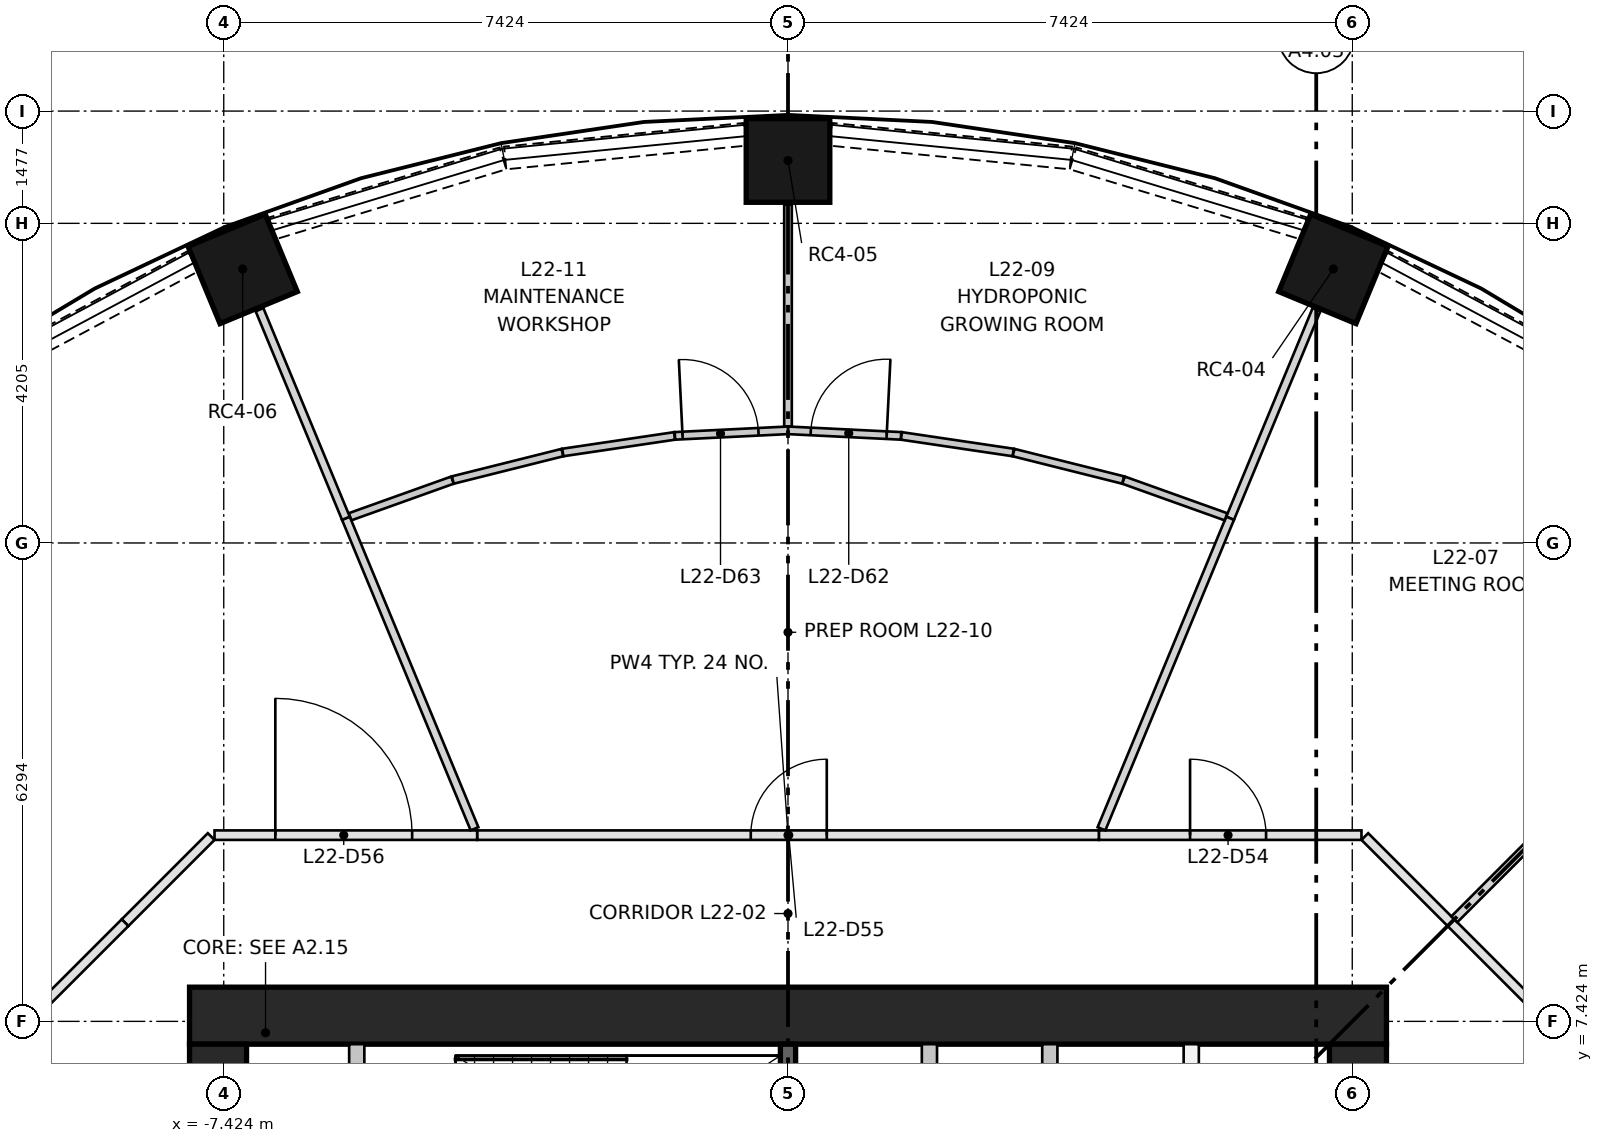
"""IFC4 building model, lengths in metres.
Left out: names, types, materials, properties, quantities, classifications, styles, units other than length and angle.
Written with IfcOpenShell. Run it as: python <this file> out.ifc"""

import sys

from ifc_helpers import new_model, si_unit, direction, frame, frame_2d, origin, origin_2d, place, context, subcontext, project, spatial, rectangle, extrude, element, fill, save


model = new_model("IFC4")
c1 = context("Model", 3, precision=1e-05, world=origin(), true_north=direction((0.0, 1.0)))
c2 = subcontext(c1, "Body", "Model", "MODEL_VIEW")
j1 = project(units=[si_unit("LENGTHUNIT", "METRE"), si_unit("PLANEANGLEUNIT", "RADIAN")], contexts=[c1])
p1 = place(None, origin())
s1 = spatial("IfcSite", under=j1, at=p1, CompositionType="ELEMENT")
p2 = place(p1, origin())
s2 = spatial("IfcBuilding", under=s1, at=p2, CompositionType="ELEMENT")
p3 = place(p2, frame((0.0, 0.0, 87.35)))
s3 = spatial("IfcBuildingStorey", under=s2, at=p3, CompositionType="ELEMENT", Elevation=87.35)
for number, where, z_axis, x_axis in (
    (1, (7.175, 17.323, 0.0), (0.0, 0.0, 1.0), (0.383, 0.924, 0.0)),
    (2, (0.0, 18.75, 0.0), (0.0, 0.0, 1.0), (0.0, 1.0, 0.0)),
    (3, (-7.175, 17.323, 0.0), (0.0, 0.0, 1.0), (-0.383, 0.924, 0.0)),
):
    element("IfcColumn", number, at=place(p3, frame(where, z_axis=z_axis, x_axis=x_axis)), inside=s3, PredefinedType="COLUMN", context=c2, shape_type="SweptSolid", body=[
        extrude(rectangle(XDim=1.1, YDim=1.1, at=origin_2d()), origin(), (0.0, 0.0, 1.0), 3.65),
    ])
p4 = place(p3, frame((-7.874, 7.499, 0.0), z_axis=(0.0, 0.0, 1.0), x_axis=(1.0, 0.0, 0.0)))
e4 = element("IfcWall", 4, at=p4, inside=s3, PredefinedType="SHEAR", context=c2, shape_type="SweptSolid", body=[
    extrude(rectangle(XDim=15.748, YDim=0.75, at=frame_2d((7.874, 0.0))), origin(), (0.0, 0.0, 1.0), 3.65),
])
p5 = place(p3, frame((-7.499, -7.124, 0.0), z_axis=(0.0, 0.0, 1.0), x_axis=(0.0, 1.0, 0.0)))
e5 = element("IfcWall", 5, at=p5, inside=s3, PredefinedType="SHEAR", context=c2, shape_type="SweptSolid", body=[
    extrude(rectangle(XDim=14.248, YDim=0.75, at=frame_2d((7.124, 0.0))), origin(), (0.0, 0.0, 1.0), 3.65),
])
p6 = place(p5, frame((6.624, 0.0, 0.0)))
e6 = element("IfcOpeningElement", 6, at=p6, cuts=e5, PredefinedType="OPENING", context=c2, shape_type="SweptSolid", body=[
    extrude(rectangle(XDim=1.0, YDim=2.1, at=frame_2d((0.5, 1.05))), frame((0.0, 0.385, 0.0), z_axis=(0.0, -1.0, 0.0), x_axis=(1.0, 0.0, 0.0)), (0.0, 0.0, 1.0), 0.77),
])
p7 = place(p5, frame((3.5, 0.0, 0.0)))
e7 = element("IfcOpeningElement", 7, at=p7, cuts=e5, PredefinedType="OPENING", context=c2, shape_type="SweptSolid", body=[
    extrude(rectangle(XDim=1.8, YDim=2.1, at=frame_2d((0.9, 1.05))), frame((0.0, 0.385, 0.0), z_axis=(0.0, -1.0, 0.0), x_axis=(1.0, 0.0, 0.0)), (0.0, 0.0, 1.0), 0.77),
])
p8 = place(p5, frame((8.948, 0.0, 0.0)))
e8 = element("IfcOpeningElement", 8, at=p8, cuts=e5, PredefinedType="OPENING", context=c2, shape_type="SweptSolid", body=[
    extrude(rectangle(XDim=1.8, YDim=2.1, at=frame_2d((0.9, 1.05))), frame((0.0, 0.385, 0.0), z_axis=(0.0, -1.0, 0.0), x_axis=(1.0, 0.0, 0.0)), (0.0, 0.0, 1.0), 0.77),
])
p9 = place(p5, frame((12.124, 0.0, 0.0)))
e9 = element("IfcOpeningElement", 9, at=p9, cuts=e5, PredefinedType="OPENING", context=c2, shape_type="SweptSolid", body=[
    extrude(rectangle(XDim=1.0, YDim=2.1, at=frame_2d((0.5, 1.05))), frame((0.0, 0.385, 0.0), z_axis=(0.0, -1.0, 0.0), x_axis=(1.0, 0.0, 0.0)), (0.0, 0.0, 1.0), 0.77),
])
p10 = place(p3, frame((7.499, -7.124, 0.0), z_axis=(0.0, 0.0, 1.0), x_axis=(0.0, 1.0, 0.0)))
e10 = element("IfcWall", 10, at=p10, inside=s3, PredefinedType="SHEAR", context=c2, shape_type="SweptSolid", body=[
    extrude(rectangle(XDim=14.248, YDim=0.75, at=frame_2d((7.124, 0.0))), origin(), (0.0, 0.0, 1.0), 3.65),
])
p11 = place(p10, frame((6.624, 0.0, 0.0)))
e11 = element("IfcOpeningElement", 11, at=p11, cuts=e10, PredefinedType="OPENING", context=c2, shape_type="SweptSolid", body=[
    extrude(rectangle(XDim=1.0, YDim=2.1, at=frame_2d((0.5, 1.05))), frame((0.0, 0.385, 0.0), z_axis=(0.0, -1.0, 0.0), x_axis=(1.0, 0.0, 0.0)), (0.0, 0.0, 1.0), 0.77),
])
p12 = place(p10, frame((3.5, 0.0, 0.0)))
e12 = element("IfcOpeningElement", 12, at=p12, cuts=e10, PredefinedType="OPENING", context=c2, shape_type="SweptSolid", body=[
    extrude(rectangle(XDim=1.8, YDim=2.1, at=frame_2d((0.9, 1.05))), frame((0.0, 0.385, 0.0), z_axis=(0.0, -1.0, 0.0), x_axis=(1.0, 0.0, 0.0)), (0.0, 0.0, 1.0), 0.77),
])
p13 = place(p10, frame((8.948, 0.0, 0.0)))
e13 = element("IfcOpeningElement", 13, at=p13, cuts=e10, PredefinedType="OPENING", context=c2, shape_type="SweptSolid", body=[
    extrude(rectangle(XDim=1.8, YDim=2.1, at=frame_2d((0.9, 1.05))), frame((0.0, 0.385, 0.0), z_axis=(0.0, -1.0, 0.0), x_axis=(1.0, 0.0, 0.0)), (0.0, 0.0, 1.0), 0.77),
])
p14 = place(p3, frame((0.0, 5.574, 0.0), z_axis=(0.0, 0.0, 1.0), x_axis=(0.0, 1.0, 0.0)))
e14 = element("IfcWall", 14, at=p14, inside=s3, PredefinedType="SHEAR", context=c2, shape_type="SweptSolid", body=[
    extrude(rectangle(XDim=1.55, YDim=0.2, at=frame_2d((0.775, 0.0))), origin(), (0.0, 0.0, 1.0), 3.3),
])
for number, where, z_axis, x_axis in (
    (15, (1.861, 4.174, 0.0), (0.0, 0.0, 1.0), (0.0, 1.0, 0.0)),
    (16, (3.445, 4.174, 0.0), (0.0, 0.0, 1.0), (0.0, 1.0, 0.0)),
    (17, (5.305, 4.174, 0.0), (0.0, 0.0, 1.0), (0.0, 1.0, 0.0)),
):
    element("IfcWall", number, at=place(p3, frame(where, z_axis=z_axis, x_axis=x_axis)), inside=s3, PredefinedType="PARTITIONING", context=c2, shape_type="SweptSolid", body=[
        extrude(rectangle(XDim=2.95, YDim=0.2, at=frame_2d((1.475, 0.0))), origin(), (0.0, 0.0, 1.0), 3.3),
    ])
p15 = place(p3, frame((-5.674, 4.174, 0.0), z_axis=(0.0, 0.0, 1.0), x_axis=(0.0, 1.0, 0.0)))
e18 = element("IfcWall", 18, at=p15, inside=s3, PredefinedType="PARTITIONING", context=c2, shape_type="SweptSolid", body=[
    extrude(rectangle(XDim=2.95, YDim=0.2, at=frame_2d((1.475, 0.0))), origin(), (0.0, 0.0, 1.0), 3.3),
])
p16 = place(p15, frame((0.125, 0.0, 0.0)))
e19 = element("IfcOpeningElement", 19, at=p16, cuts=e18, PredefinedType="OPENING", context=c2, shape_type="SweptSolid", body=[
    extrude(rectangle(XDim=0.95, YDim=2.1, at=frame_2d((0.475, 1.05))), frame((0.0, 0.11, 0.0), z_axis=(0.0, -1.0, 0.0), x_axis=(1.0, 0.0, 0.0)), (0.0, 0.0, 1.0), 0.22),
])
p17 = place(p15, frame((1.725, 0.0, 0.0)))
e20 = element("IfcOpeningElement", 20, at=p17, cuts=e18, PredefinedType="OPENING", context=c2, shape_type="SweptSolid", body=[
    extrude(rectangle(XDim=0.95, YDim=2.1, at=frame_2d((0.475, 1.05))), frame((0.0, 0.11, 0.0), z_axis=(0.0, -1.0, 0.0), x_axis=(1.0, 0.0, 0.0)), (0.0, 0.0, 1.0), 0.22),
])
p18 = place(p3, frame((10.626, 15.929, 0.0), z_axis=(0.0, 0.0, 1.0), x_axis=(-0.88188808669, 0.471458802606, 0.0)))
e21 = element("IfcWall", 21, at=p18, inside=s3, PredefinedType="SOLIDWALL", context=c2, shape_type="SweptSolid", body=[
    extrude(rectangle(XDim=3.172, YDim=0.3, at=frame_2d((1.586, 0.0))), origin(), (0.0, 0.0, 1.0), 0.9),
])
p19 = place(p3, frame((6.787, 17.856, 0.0), z_axis=(0.0, 0.0, 1.0), x_axis=(-0.956927923582, 0.290325591482, 0.0)))
e22 = element("IfcWall", 22, at=p19, inside=s3, PredefinedType="SOLIDWALL", context=c2, shape_type="SweptSolid", body=[
    extrude(rectangle(XDim=3.173, YDim=0.3, at=frame_2d((1.586, 0.0))), origin(), (0.0, 0.0, 1.0), 0.9),
])
for number, where, z_axis, x_axis in (
    (23, (3.721, 18.783, 0.0), (0.0, 0.0, 1.0), (-0.995, 0.098, 0.0)),
    (24, (-0.564, 19.094, 0.0), (0.0, 0.0, 1.0), (-0.995, -0.098, 0.0)),
):
    element("IfcWall", number, at=place(p3, frame(where, z_axis=z_axis, x_axis=x_axis)), inside=s3, PredefinedType="SOLIDWALL", context=c2, shape_type="SweptSolid", body=[
        extrude(rectangle(XDim=3.173, YDim=0.3, at=frame_2d((1.586, 0.0))), origin(), (0.0, 0.0, 1.0), 0.9),
    ])
p20 = place(p3, frame((-3.75, 18.778, 0.0), z_axis=(0.0, 0.0, 1.0), x_axis=(-0.956927923582, -0.290325591482, 0.0)))
e25 = element("IfcWall", 25, at=p20, inside=s3, PredefinedType="SOLIDWALL", context=c2, shape_type="SweptSolid", body=[
    extrude(rectangle(XDim=3.173, YDim=0.3, at=frame_2d((1.586, 0.0))), origin(), (0.0, 0.0, 1.0), 0.9),
])
p21 = place(p3, frame((-7.828, 17.425, 0.0), z_axis=(0.0, 0.0, 1.0), x_axis=(-0.88188808669, -0.471458802606, 0.0)))
e26 = element("IfcWall", 26, at=p21, inside=s3, PredefinedType="SOLIDWALL", context=c2, shape_type="SweptSolid", body=[
    extrude(rectangle(XDim=3.172, YDim=0.3, at=frame_2d((1.586, 0.0))), origin(), (0.0, 0.0, 1.0), 0.9),
])
p22 = place(p3, frame((8.722, 8.722, 0.0), z_axis=(0.0, 0.0, 1.0), x_axis=(0.70718294931, -0.707030604857, 0.0)))
e27 = element("IfcWall", 27, at=p22, inside=s3, PredefinedType="PARTITIONING", context=c2, shape_type="SweptSolid", body=[
    extrude(rectangle(XDim=1.603, YDim=0.125, at=frame_2d((0.801, 0.0))), origin(), (0.0, 0.0, 1.0), 3.3),
])
p23 = place(p3, frame((4.09, 9.874, 0.0), z_axis=(0.0, 0.0, 1.0), x_axis=(1.0, 0.0, 0.0)))
e28 = element("IfcWall", 28, at=p23, inside=s3, PredefinedType="PARTITIONING", context=c2, shape_type="SweptSolid", body=[
    extrude(rectangle(XDim=3.455, YDim=0.125, at=frame_2d((1.728, 0.0))), origin(), (0.0, 0.0, 1.0), 3.3),
])
p24 = place(p23, frame((1.2, 0.0, 0.0)))
e29 = element("IfcOpeningElement", 29, at=p24, cuts=e28, PredefinedType="OPENING", context=c2, shape_type="SweptSolid", body=[
    extrude(rectangle(XDim=1.0, YDim=2.1, at=frame_2d((0.5, 1.05))), frame((0.0, 0.073, 0.0), z_axis=(0.0, -1.0, 0.0), x_axis=(1.0, 0.0, 0.0)), (0.0, 0.0, 1.0), 0.145),
])
p25 = place(p3, frame((7.589, 9.856, 0.0), z_axis=(0.0, 0.0, 1.0), x_axis=(0.707030604857, -0.70718294931, 0.0)))
e30 = element("IfcWall", 30, at=p25, inside=s3, PredefinedType="PARTITIONING", context=c2, shape_type="SweptSolid", body=[
    extrude(rectangle(XDim=1.603, YDim=0.125, at=frame_2d((0.801, 0.0))), origin(), (0.0, 0.0, 1.0), 3.3),
])
p26 = place(p3, frame((-4.09, 9.874, 0.0), z_axis=(0.0, 0.0, 1.0), x_axis=(1.0, 0.0, 0.0)))
e31 = element("IfcWall", 31, at=p26, inside=s3, PredefinedType="PARTITIONING", context=c2, shape_type="SweptSolid", body=[
    extrude(rectangle(XDim=8.18, YDim=0.125, at=frame_2d((4.09, 0.0))), origin(), (0.0, 0.0, 1.0), 3.3),
])
p27 = place(p26, frame((3.6, 0.0, 0.0)))
e32 = element("IfcOpeningElement", 32, at=p27, cuts=e31, PredefinedType="OPENING", context=c2, shape_type="SweptSolid", body=[
    extrude(rectangle(XDim=1.0, YDim=2.1, at=frame_2d((0.5, 1.05))), frame((0.0, 0.073, 0.0), z_axis=(0.0, -1.0, 0.0), x_axis=(1.0, 0.0, 0.0)), (0.0, 0.0, 1.0), 0.145),
])
p28 = place(p3, frame((-8.722, 8.722, 0.0), z_axis=(0.0, 0.0, 1.0), x_axis=(0.707030604857, 0.70718294931, 0.0)))
e33 = element("IfcWall", 33, at=p28, inside=s3, PredefinedType="PARTITIONING", context=c2, shape_type="SweptSolid", body=[
    extrude(rectangle(XDim=1.603, YDim=0.125, at=frame_2d((0.801, 0.0))), origin(), (0.0, 0.0, 1.0), 3.3),
])
p29 = place(p3, frame((-7.545, 9.874, 0.0), z_axis=(0.0, 0.0, 1.0), x_axis=(1.0, 0.0, 0.0)))
e34 = element("IfcWall", 34, at=p29, inside=s3, PredefinedType="PARTITIONING", context=c2, shape_type="SweptSolid", body=[
    extrude(rectangle(XDim=3.455, YDim=0.125, at=frame_2d((1.728, 0.0))), origin(), (0.0, 0.0, 1.0), 3.3),
])
p30 = place(p29, frame((0.8, 0.0, 0.0)))
e35 = element("IfcOpeningElement", 35, at=p30, cuts=e34, PredefinedType="OPENING", context=c2, shape_type="SweptSolid", body=[
    extrude(rectangle(XDim=1.8, YDim=2.1, at=frame_2d((0.9, 1.05))), frame((0.0, 0.073, 0.0), z_axis=(0.0, -1.0, 0.0), x_axis=(1.0, 0.0, 0.0)), (0.0, 0.0, 1.0), 0.145),
])
p31 = place(p3, frame((-9.856, 7.589, 0.0), z_axis=(0.0, 0.0, 1.0), x_axis=(0.70718294931, 0.707030604857, 0.0)))
e36 = element("IfcWall", 36, at=p31, inside=s3, PredefinedType="PARTITIONING", context=c2, shape_type="SweptSolid", body=[
    extrude(rectangle(XDim=1.603, YDim=0.125, at=frame_2d((0.801, 0.0))), origin(), (0.0, 0.0, 1.0), 3.3),
])
p32 = place(p3, frame((12.848, 12.848, 0.0), z_axis=(0.0, 0.0, 1.0), x_axis=(-0.707106781187, -0.707106781187, 0.0)))
e37 = element("IfcWall", 37, at=p32, inside=s3, PredefinedType="PARTITIONING", context=c2, shape_type="SweptSolid", body=[
    extrude(rectangle(XDim=5.772, YDim=0.11, at=frame_2d((2.886, 0.0))), origin(), (0.0, 0.0, 1.0), 3.3),
])
p33 = place(p3, frame((5.817, 14.043, 0.0), z_axis=(0.0, 0.0, 1.0), x_axis=(0.382659139036, 0.923889594764, 0.0)))
e38 = element("IfcWall", 38, at=p33, inside=s3, PredefinedType="PARTITIONING", context=c2, shape_type="SweptSolid", body=[
    extrude(rectangle(XDim=2.97, YDim=0.11, at=frame_2d((1.485, 0.0))), origin(), (0.0, 0.0, 1.0), 3.3),
])
p34 = place(p3, frame((4.125, 9.958, 0.0), z_axis=(0.0, 0.0, 1.0), x_axis=(0.382709362011, 0.923868791674, 0.0)))
e39 = element("IfcWall", 39, at=p34, inside=s3, PredefinedType="PARTITIONING", context=c2, shape_type="SweptSolid", body=[
    extrude(rectangle(XDim=4.422, YDim=0.11, at=frame_2d((2.211, 0.0))), origin(), (0.0, 0.0, 1.0), 3.3),
])
p35 = place(p3, frame((0.0, 15.2, 0.0), z_axis=(0.0, 0.0, 1.0), x_axis=(0.998797711146, -0.049021752402, 0.0)))
e40 = element("IfcWall", 40, at=p35, inside=s3, PredefinedType="PARTITIONING", context=c2, shape_type="SweptSolid", body=[
    extrude(rectangle(XDim=1.489, YDim=0.1, at=frame_2d((0.745, 0.0))), origin(), (0.0, 0.0, 1.0), 3.3),
])
p36 = place(p35, frame((0.3, 0.0, 0.0)))
e41 = element("IfcOpeningElement", 41, at=p36, cuts=e40, PredefinedType="OPENING", context=c2, shape_type="SweptSolid", body=[
    extrude(rectangle(XDim=1.0, YDim=2.1, at=frame_2d((0.5, 1.05))), frame((0.0, 0.06, 0.0), z_axis=(0.0, -1.0, 0.0), x_axis=(1.0, 0.0, 0.0)), (0.0, 0.0, 1.0), 0.12),
])
p37 = place(p3, frame((2.963, 14.908, 0.0), z_axis=(0.0, 0.0, 1.0), x_axis=(-0.989166402168, 0.146798599525, 0.0)))
e42 = element("IfcWall", 42, at=p37, inside=s3, PredefinedType="PARTITIONING", context=c2, shape_type="SweptSolid", body=[
    extrude(rectangle(XDim=1.487, YDim=0.1, at=frame_2d((0.743, 0.0))), origin(), (0.0, 0.0, 1.0), 3.3),
])
p38 = place(p3, frame((4.41, 14.546, 0.0), z_axis=(0.0, 0.0, 1.0), x_axis=(-0.970055497102, 0.242883372306, 0.0)))
e43 = element("IfcWall", 43, at=p38, inside=s3, PredefinedType="PARTITIONING", context=c2, shape_type="SweptSolid", body=[
    extrude(rectangle(XDim=1.487, YDim=0.1, at=frame_2d((0.743, 0.0))), origin(), (0.0, 0.0, 1.0), 3.3),
])
p39 = place(p3, frame((5.763, 14.062, 0.0), z_axis=(0.0, 0.0, 1.0), x_axis=(-0.941587499657, 0.33676843749, 0.0)))
e44 = element("IfcWall", 44, at=p39, inside=s3, PredefinedType="PARTITIONING", context=c2, shape_type="SweptSolid", body=[
    extrude(rectangle(XDim=1.432, YDim=0.1, at=frame_2d((0.716, 0.0))), origin(), (0.0, 0.0, 1.0), 3.3),
])
p40 = place(p3, frame((0.0, 15.252, 0.0), z_axis=(0.0, 0.0, 1.0), x_axis=(0.0, 1.0, 0.0)))
e45 = element("IfcWall", 45, at=p40, inside=s3, PredefinedType="PARTITIONING", context=c2, shape_type="SweptSolid", body=[
    extrude(rectangle(XDim=2.917, YDim=0.1, at=frame_2d((1.459, 0.0))), origin(), (0.0, 0.0, 1.0), 3.3),
])
p41 = place(p3, frame((-5.763, 14.062, 0.0), z_axis=(0.0, 0.0, 1.0), x_axis=(0.941587499657, 0.33676843749, 0.0)))
e46 = element("IfcWall", 46, at=p41, inside=s3, PredefinedType="PARTITIONING", context=c2, shape_type="SweptSolid", body=[
    extrude(rectangle(XDim=1.432, YDim=0.1, at=frame_2d((0.716, 0.0))), origin(), (0.0, 0.0, 1.0), 3.3),
])
p42 = place(p3, frame((-4.41, 14.546, 0.0), z_axis=(0.0, 0.0, 1.0), x_axis=(0.970055497102, 0.242883372306, 0.0)))
e47 = element("IfcWall", 47, at=p42, inside=s3, PredefinedType="PARTITIONING", context=c2, shape_type="SweptSolid", body=[
    extrude(rectangle(XDim=1.487, YDim=0.1, at=frame_2d((0.743, 0.0))), origin(), (0.0, 0.0, 1.0), 3.3),
])
p43 = place(p3, frame((-2.963, 14.908, 0.0), z_axis=(0.0, 0.0, 1.0), x_axis=(0.989166402168, 0.146798599525, 0.0)))
e48 = element("IfcWall", 48, at=p43, inside=s3, PredefinedType="PARTITIONING", context=c2, shape_type="SweptSolid", body=[
    extrude(rectangle(XDim=1.487, YDim=0.1, at=frame_2d((0.743, 0.0))), origin(), (0.0, 0.0, 1.0), 3.3),
])
p44 = place(p3, frame((-1.487, 15.127, 0.0), z_axis=(0.0, 0.0, 1.0), x_axis=(0.998797711146, 0.049021752402, 0.0)))
e49 = element("IfcWall", 49, at=p44, inside=s3, PredefinedType="PARTITIONING", context=c2, shape_type="SweptSolid", body=[
    extrude(rectangle(XDim=1.489, YDim=0.1, at=frame_2d((0.745, 0.0))), origin(), (0.0, 0.0, 1.0), 3.3),
])
p45 = place(p44, frame((0.1, 0.0, 0.0)))
e50 = element("IfcOpeningElement", 50, at=p45, cuts=e49, PredefinedType="OPENING", context=c2, shape_type="SweptSolid", body=[
    extrude(rectangle(XDim=1.0, YDim=2.1, at=frame_2d((0.5, 1.05))), frame((0.0, 0.06, 0.0), z_axis=(0.0, -1.0, 0.0), x_axis=(1.0, 0.0, 0.0)), (0.0, 0.0, 1.0), 0.12),
])
p46 = place(p3, frame((-4.125, 9.958, 0.0), z_axis=(0.0, 0.0, 1.0), x_axis=(-0.382709362011, 0.923868791674, 0.0)))
e51 = element("IfcWall", 51, at=p46, inside=s3, PredefinedType="PARTITIONING", context=c2, shape_type="SweptSolid", body=[
    extrude(rectangle(XDim=4.422, YDim=0.11, at=frame_2d((2.211, 0.0))), origin(), (0.0, 0.0, 1.0), 3.3),
])
p47 = place(p3, frame((-5.817, 14.043, 0.0), z_axis=(0.0, 0.0, 1.0), x_axis=(-0.382659139036, 0.923889594764, 0.0)))
e52 = element("IfcWall", 52, at=p47, inside=s3, PredefinedType="PARTITIONING", context=c2, shape_type="SweptSolid", body=[
    extrude(rectangle(XDim=2.97, YDim=0.11, at=frame_2d((1.485, 0.0))), origin(), (0.0, 0.0, 1.0), 3.3),
])
p48 = place(p24, origin())
e53 = element("IfcDoor", 53, at=p48, inside=s3, OperationType="SINGLE_SWING_LEFT", PredefinedType="DOOR", context=c2, shape_type="SweptSolid", body=[
    extrude(rectangle(XDim=1.0, YDim=2.1, at=frame_2d((0.5, 1.05))), frame((0.0, 0.025, 0.0), z_axis=(0.0, -1.0, 0.0), x_axis=(1.0, 0.0, 0.0)), (0.0, 0.0, 1.0), 0.05),
])
fill(e29, e53)
p49 = place(p27, origin())
e54 = element("IfcDoor", 54, at=p49, inside=s3, OperationType="SINGLE_SWING_RIGHT", PredefinedType="DOOR", context=c2, shape_type="SweptSolid", body=[
    extrude(rectangle(XDim=1.0, YDim=2.1, at=frame_2d((0.5, 1.05))), frame((0.0, 0.025, 0.0), z_axis=(0.0, -1.0, 0.0), x_axis=(1.0, 0.0, 0.0)), (0.0, 0.0, 1.0), 0.05),
])
fill(e32, e54)
p50 = place(p30, origin())
e55 = element("IfcDoor", 55, at=p50, inside=s3, OperationType="DOUBLE_DOOR_SINGLE_SWING", PredefinedType="DOOR", context=c2, shape_type="SweptSolid", body=[
    extrude(rectangle(XDim=1.8, YDim=2.1, at=frame_2d((0.9, 1.05))), frame((0.0, 0.025, 0.0), z_axis=(0.0, -1.0, 0.0), x_axis=(1.0, 0.0, 0.0)), (0.0, 0.0, 1.0), 0.05),
])
fill(e35, e55)
p51 = place(p36, origin())
e56 = element("IfcDoor", 56, at=p51, inside=s3, OperationType="SINGLE_SWING_RIGHT", PredefinedType="DOOR", context=c2, shape_type="SweptSolid", body=[
    extrude(rectangle(XDim=1.0, YDim=2.1, at=frame_2d((0.5, 1.05))), frame((0.0, 0.025, 0.0), z_axis=(0.0, -1.0, 0.0), x_axis=(1.0, 0.0, 0.0)), (0.0, 0.0, 1.0), 0.05),
])
fill(e41, e56)
p52 = place(p45, origin())
e57 = element("IfcDoor", 57, at=p52, inside=s3, OperationType="SINGLE_SWING_LEFT", PredefinedType="DOOR", context=c2, shape_type="SweptSolid", body=[
    extrude(rectangle(XDim=1.0, YDim=2.1, at=frame_2d((0.5, 1.05))), frame((0.0, 0.025, 0.0), z_axis=(0.0, -1.0, 0.0), x_axis=(1.0, 0.0, 0.0)), (0.0, 0.0, 1.0), 0.05),
])
fill(e50, e57)
save(model, sys.argv[1])
